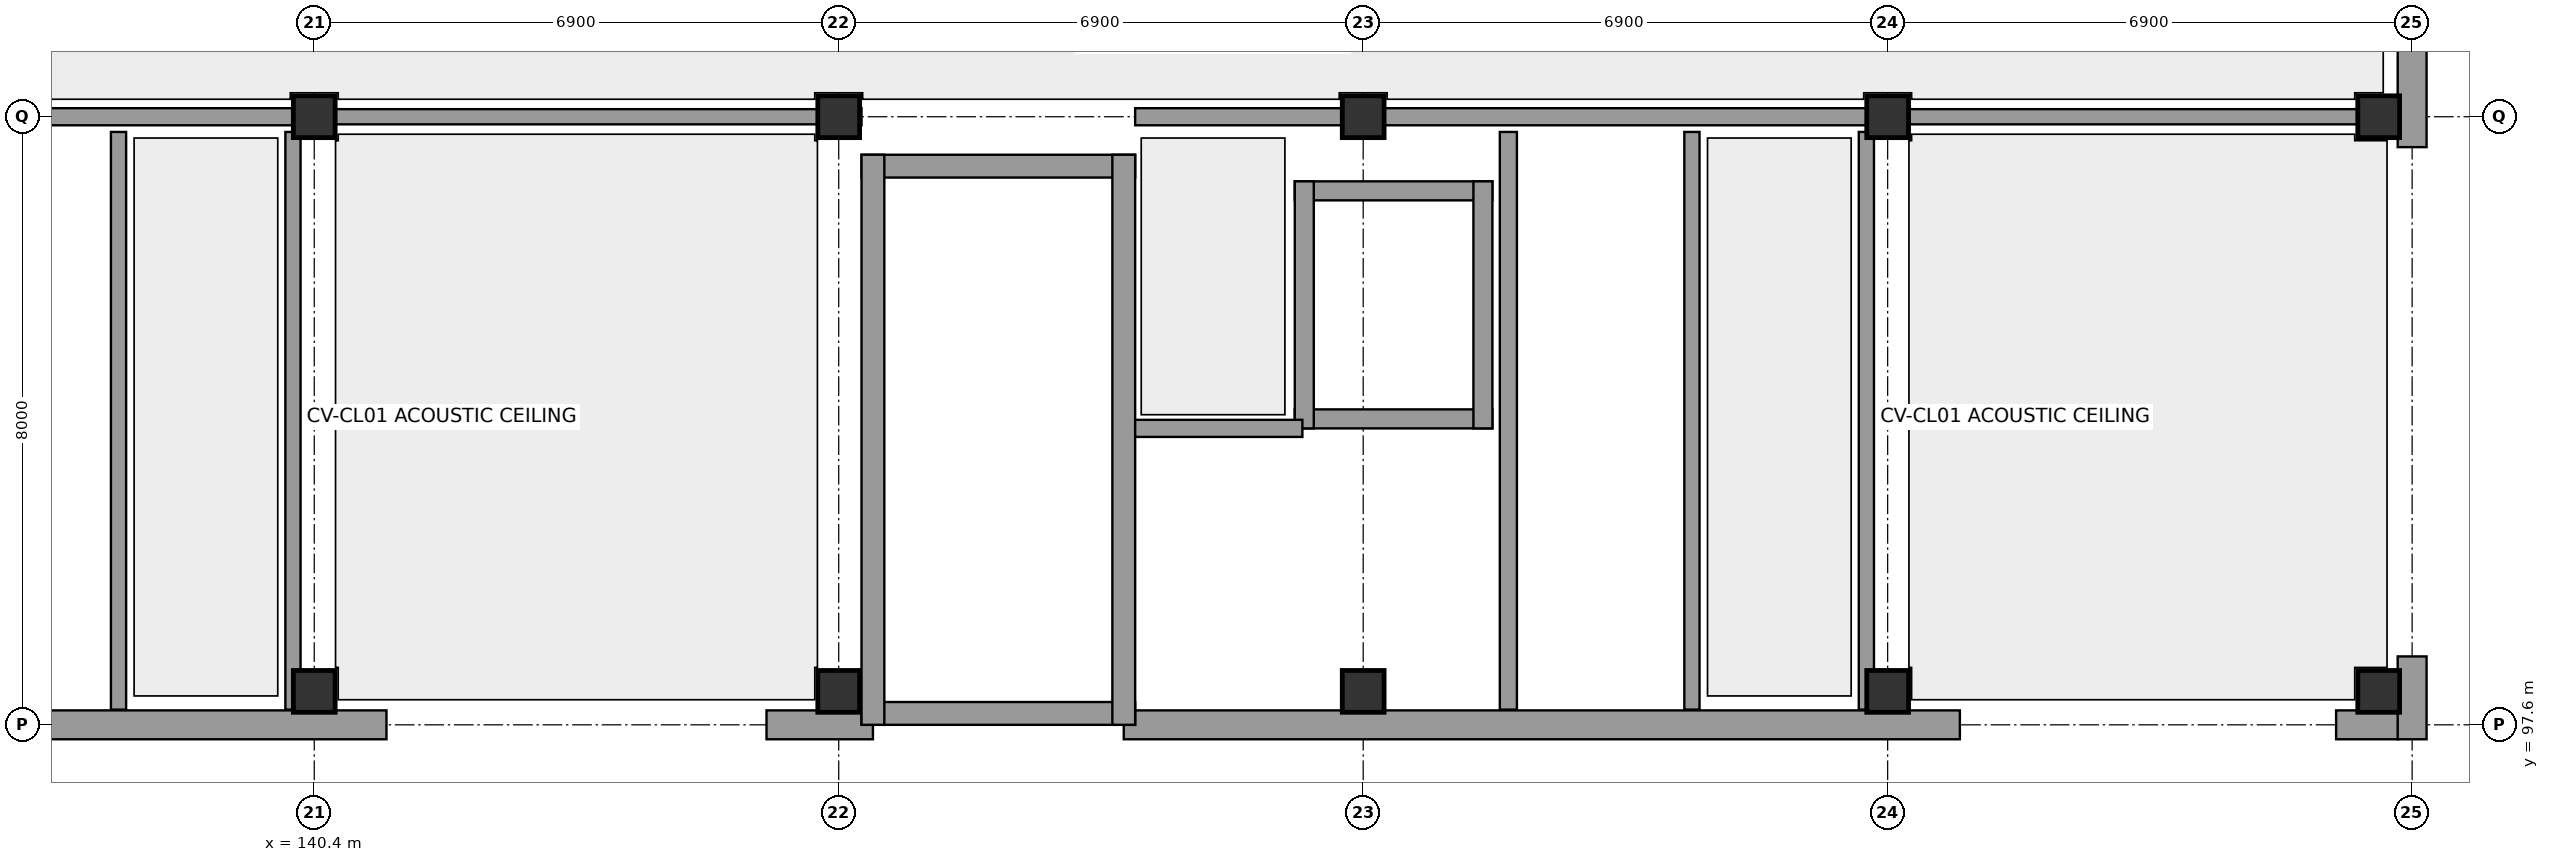
"""IFC4 building model, lengths in metres.
Left out: names, types, materials, properties, quantities, classifications, styles, units other than length and angle.
Written with IfcOpenShell. Run it as: python <this file> out.ifc"""

import sys

from ifc_helpers import new_model, si_unit, direction, frame, frame_2d, origin, origin_with_axes, origin_2d, place, context, subcontext, project, spatial, rectangle, extrude, element, fill, save


model = new_model("IFC4")
c1 = context("Model", 3, precision=1e-05, world=origin(), true_north=direction((0.0, 1.0)))
c2 = subcontext(c1, "Body", "Model", "MODEL_VIEW")
j1 = project(units=[si_unit("LENGTHUNIT", "METRE"), si_unit("PLANEANGLEUNIT", "RADIAN")], contexts=[c1])
p1 = place(None, origin())
s1 = spatial("IfcSite", under=j1, at=p1, CompositionType="ELEMENT")
p2 = place(p1, origin())
s2 = spatial("IfcBuilding", under=s1, at=p2, CompositionType="ELEMENT")
p3 = place(p2, origin())
s3 = spatial("IfcBuildingStorey", under=s2, at=p3, CompositionType="ELEMENT", Elevation=0.0)
for number, where, z_axis, x_axis in (
    (1, (140.4, 98.04, 0.0), (0.0, 0.0, 1.0), (1.0, 0.0, 0.0)),
    (2, (140.4, 105.6, 0.0), (0.0, 0.0, 1.0), (1.0, 0.0, 0.0)),
    (3, (147.3, 98.04, 0.0), (0.0, 0.0, 1.0), (1.0, 0.0, 0.0)),
    (4, (147.3, 105.6, 0.0), (0.0, 0.0, 1.0), (1.0, 0.0, 0.0)),
    (5, (154.2, 98.04, 0.0), (0.0, 0.0, 1.0), (1.0, 0.0, 0.0)),
    (6, (154.2, 105.6, 0.0), (0.0, 0.0, 1.0), (1.0, 0.0, 0.0)),
    (7, (161.1, 98.04, 0.0), (0.0, 0.0, 1.0), (1.0, 0.0, 0.0)),
    (8, (161.1, 105.6, 0.0), (0.0, 0.0, 1.0), (1.0, 0.0, 0.0)),
    (9, (167.56, 98.04, 0.0), (0.0, 0.0, 1.0), (1.0, 0.0, 0.0)),
    (10, (167.56, 105.6, 0.0), (0.0, 0.0, 1.0), (1.0, 0.0, 0.0)),
):
    element("IfcColumn", number, at=place(p3, frame(where, z_axis=z_axis, x_axis=x_axis)), inside=s3, PredefinedType="COLUMN", context=c2, shape_type="SweptSolid", body=[
        extrude(rectangle(XDim=0.55, YDim=0.55, at=origin_2d()), origin(), (0.0, 0.0, 1.0), 4.4),
    ])
p4 = place(p3, frame((130.35, 97.6, 0.0), z_axis=(0.0, 0.0, 1.0), x_axis=(1.0, 0.0, 0.0)))
e11 = element("IfcWall", 11, at=p4, inside=s3, PredefinedType="STANDARD", context=c2, shape_type="SweptSolid", body=[
    extrude(rectangle(XDim=11.0, YDim=0.38, at=frame_2d((5.5, 0.0))), origin(), (0.0, 0.0, 1.0), 4.12),
])
p5 = place(p3, frame((146.35, 97.6, 0.0), z_axis=(0.0, 0.0, 1.0), x_axis=(1.0, 0.0, 0.0)))
e12 = element("IfcWall", 12, at=p5, inside=s3, PredefinedType="STANDARD", context=c2, shape_type="SweptSolid", body=[
    extrude(rectangle(XDim=1.4, YDim=0.38, at=frame_2d((0.7, 0.0))), origin(), (0.0, 0.0, 1.0), 4.12),
])
p6 = place(p3, frame((151.05, 97.6, 0.0), z_axis=(0.0, 0.0, 1.0), x_axis=(1.0, 0.0, 0.0)))
e13 = element("IfcWall", 13, at=p6, inside=s3, PredefinedType="STANDARD", context=c2, shape_type="SweptSolid", body=[
    extrude(rectangle(XDim=11.0, YDim=0.38, at=frame_2d((5.5, 0.0))), origin(), (0.0, 0.0, 1.0), 4.12),
])
p7 = place(p3, frame((167.0, 97.6, 0.0), z_axis=(0.0, 0.0, 1.0), x_axis=(1.0, 0.0, 0.0)))
e14 = element("IfcWall", 14, at=p7, inside=s3, PredefinedType="STANDARD", context=c2, shape_type="SweptSolid", body=[
    extrude(rectangle(XDim=0.82, YDim=0.38, at=frame_2d((0.41, 0.0))), origin(), (0.0, 0.0, 1.0), 4.12),
])
p8 = place(p3, frame((168.0, 97.41, 0.0), z_axis=(0.0, 0.0, 1.0), x_axis=(0.0, 1.0, 0.0)))
e15 = element("IfcWall", 15, at=p8, inside=s3, PredefinedType="STANDARD", context=c2, shape_type="SweptSolid", body=[
    extrude(rectangle(XDim=1.09, YDim=0.38, at=frame_2d((0.545, 0.0))), origin(), (0.0, 0.0, 1.0), 4.12),
])
p9 = place(p3, frame((168.0, 105.2, 0.0), z_axis=(0.0, 0.0, 1.0), x_axis=(0.0, 1.0, 0.0)))
e16 = element("IfcWall", 16, at=p9, inside=s3, PredefinedType="STANDARD", context=c2, shape_type="SweptSolid", body=[
    extrude(rectangle(XDim=3.2, YDim=0.38, at=frame_2d((1.6, 0.0))), origin(), (0.0, 0.0, 1.0), 4.12),
])
for number, where, z_axis, x_axis in (
    (17, (137.825, 97.8, 0.0), (0.0, 0.0, 1.0), (0.0, 1.0, 0.0)),
    (18, (140.12, 97.8, 0.0), (0.0, 0.0, 1.0), (0.0, 1.0, 0.0)),
):
    element("IfcWall", number, at=place(p3, frame(where, z_axis=z_axis, x_axis=x_axis)), inside=s3, PredefinedType="PARTITIONING", context=c2, shape_type="SweptSolid", body=[
        extrude(rectangle(XDim=7.6, YDim=0.2, at=frame_2d((3.8, 0.0))), origin(), (0.0, 0.0, 1.0), 4.12),
    ])
p10 = place(p3, frame((130.5, 105.6, 0.0), z_axis=(0.0, 0.0, 1.0), x_axis=(1.0, 0.0, 0.0)))
e19 = element("IfcWall", 19, at=p10, inside=s3, PredefinedType="PARTITIONING", context=c2, shape_type="SweptSolid", body=[
    extrude(rectangle(XDim=9.9, YDim=0.225, at=frame_2d((4.95, 0.0))), origin(), (0.0, 0.0, 1.0), 3.56),
])
p11 = place(p10, frame((0.475, 0.0, 0.0)))
e20 = element("IfcOpeningElement", 20, at=p11, cuts=e19, PredefinedType="OPENING", context=c2, shape_type="SweptSolid", body=[
    extrude(rectangle(XDim=1.1, YDim=2.15, at=frame_2d((0.55, 1.075))), frame((0.0, 0.125, 0.0), z_axis=(0.0, -1.0, 0.0), x_axis=(1.0, 0.0, 0.0)), (0.0, 0.0, 1.0), 0.249),
])
p12 = place(p10, frame((5.75, 0.0, 0.0)))
e21 = element("IfcOpeningElement", 21, at=p12, cuts=e19, PredefinedType="OPENING", context=c2, shape_type="SweptSolid", body=[
    extrude(rectangle(XDim=0.9, YDim=2.1, at=frame_2d((0.45, 1.05))), frame((0.0, 0.125, 0.0), z_axis=(0.0, -1.0, 0.0), x_axis=(1.0, 0.0, 0.0)), (0.0, 0.0, 1.0), 0.249),
])
p13 = place(p10, frame((7.8, 0.0, 0.0)))
e22 = element("IfcOpeningElement", 22, at=p13, cuts=e19, PredefinedType="OPENING", context=c2, shape_type="SweptSolid", body=[
    extrude(rectangle(XDim=0.95, YDim=2.15, at=frame_2d((0.475, 1.075))), frame((0.0, 0.125, 0.0), z_axis=(0.0, -1.0, 0.0), x_axis=(1.0, 0.0, 0.0)), (0.0, 0.0, 1.0), 0.249),
])
p14 = place(p3, frame((147.6, 97.75, 0.0), z_axis=(0.0, 0.0, 1.0), x_axis=(1.0, 0.0, 0.0)))
e23 = element("IfcWall", 23, at=p14, inside=s3, PredefinedType="SHEAR", context=c2, shape_type="SweptSolid", body=[
    extrude(rectangle(XDim=3.6, YDim=0.3, at=frame_2d((1.8, 0.0))), origin(), (0.0, 0.0, 1.0), 4.12),
])
p15 = place(p14, frame((1.1, 0.0, 0.0)))
e24 = element("IfcOpeningElement", 24, at=p15, cuts=e23, PredefinedType="OPENING", context=c2, shape_type="SweptSolid", body=[
    extrude(rectangle(XDim=1.4, YDim=2.25, at=frame_2d((0.7, 1.125))), frame((0.0, 0.162, 0.0), z_axis=(0.0, -1.0, 0.0), x_axis=(1.0, 0.0, 0.0)), (0.0, 0.0, 1.0), 0.324),
])
p16 = place(p3, frame((147.6, 104.95, 0.0), z_axis=(0.0, 0.0, 1.0), x_axis=(1.0, 0.0, 0.0)))
e25 = element("IfcWall", 25, at=p16, inside=s3, PredefinedType="SHEAR", context=c2, shape_type="SweptSolid", body=[
    extrude(rectangle(XDim=3.6, YDim=0.3, at=frame_2d((1.8, 0.0))), origin(), (0.0, 0.0, 1.0), 4.12),
])
p17 = place(p3, frame((147.75, 97.6, 0.0), z_axis=(0.0, 0.0, 1.0), x_axis=(0.0, 1.0, 0.0)))
e26 = element("IfcWall", 26, at=p17, inside=s3, PredefinedType="SHEAR", context=c2, shape_type="SweptSolid", body=[
    extrude(rectangle(XDim=7.5, YDim=0.3, at=frame_2d((3.75, 0.0))), origin(), (0.0, 0.0, 1.0), 4.12),
])
p18 = place(p3, frame((151.05, 97.6, 0.0), z_axis=(0.0, 0.0, 1.0), x_axis=(0.0, 1.0, 0.0)))
e27 = element("IfcWall", 27, at=p18, inside=s3, PredefinedType="SHEAR", context=c2, shape_type="SweptSolid", body=[
    extrude(rectangle(XDim=7.5, YDim=0.3, at=frame_2d((3.75, 0.0))), origin(), (0.0, 0.0, 1.0), 4.12),
])
p19 = place(p18, frame((0.65, 0.0, 0.0)))
e28 = element("IfcOpeningElement", 28, at=p19, cuts=e27, PredefinedType="OPENING", context=c2, shape_type="SweptSolid", body=[
    extrude(rectangle(XDim=1.15, YDim=2.15, at=frame_2d((0.575, 1.075))), frame((0.0, 0.162, 0.0), z_axis=(0.0, -1.0, 0.0), x_axis=(1.0, 0.0, 0.0)), (0.0, 0.0, 1.0), 0.324),
])
p20 = place(p3, frame((153.3, 101.625, 0.0), z_axis=(0.0, 0.0, 1.0), x_axis=(1.0, 0.0, 0.0)))
e29 = element("IfcWall", 29, at=p20, inside=s3, PredefinedType="SHEAR", context=c2, shape_type="SweptSolid", body=[
    extrude(rectangle(XDim=2.6, YDim=0.25, at=frame_2d((1.3, 0.0))), origin(), (0.0, 0.0, 1.0), 4.12),
])
p21 = place(p20, frame((0.925, 0.0, 0.0)))
e30 = element("IfcOpeningElement", 30, at=p21, cuts=e29, PredefinedType="OPENING", context=c2, shape_type="SweptSolid", body=[
    extrude(rectangle(XDim=1.0, YDim=2.1, at=frame_2d((0.5, 1.05))), frame((0.0, 0.137, 0.0), z_axis=(0.0, -1.0, 0.0), x_axis=(1.0, 0.0, 0.0)), (0.0, 0.0, 1.0), 0.274),
])
p22 = place(p3, frame((153.3, 104.625, 0.0), z_axis=(0.0, 0.0, 1.0), x_axis=(1.0, 0.0, 0.0)))
e31 = element("IfcWall", 31, at=p22, inside=s3, PredefinedType="SHEAR", context=c2, shape_type="SweptSolid", body=[
    extrude(rectangle(XDim=2.6, YDim=0.25, at=frame_2d((1.3, 0.0))), origin(), (0.0, 0.0, 1.0), 4.12),
])
for number, where, z_axis, x_axis in (
    (32, (153.425, 101.5, 0.0), (0.0, 0.0, 1.0), (0.0, 1.0, 0.0)),
    (33, (155.775, 101.5, 0.0), (0.0, 0.0, 1.0), (0.0, 1.0, 0.0)),
):
    element("IfcWall", number, at=place(p3, frame(where, z_axis=z_axis, x_axis=x_axis)), inside=s3, PredefinedType="SHEAR", context=c2, shape_type="SweptSolid", body=[
        extrude(rectangle(XDim=3.25, YDim=0.25, at=frame_2d((1.625, 0.0))), origin(), (0.0, 0.0, 1.0), 4.12),
    ])
p23 = place(p3, frame((156.11, 97.8, 0.0), z_axis=(0.0, 0.0, 1.0), x_axis=(0.0, 1.0, 0.0)))
e34 = element("IfcWall", 34, at=p23, inside=s3, PredefinedType="PARTITIONING", context=c2, shape_type="SweptSolid", body=[
    extrude(rectangle(XDim=7.6, YDim=0.225, at=frame_2d((3.8, 0.0))), origin(), (0.0, 0.0, 1.0), 3.79),
])
p24 = place(p3, frame((151.2, 101.5, 0.0), z_axis=(0.0, 0.0, 1.0), x_axis=(1.0, 0.0, 0.0)))
e35 = element("IfcWall", 35, at=p24, inside=s3, PredefinedType="PARTITIONING", context=c2, shape_type="SweptSolid", body=[
    extrude(rectangle(XDim=2.2, YDim=0.225, at=frame_2d((1.1, 0.0))), origin(), (0.0, 0.0, 1.0), 4.12),
])
p25 = place(p24, frame((0.45, 0.0, 0.0)))
e36 = element("IfcOpeningElement", 36, at=p25, cuts=e35, PredefinedType="OPENING", context=c2, shape_type="SweptSolid", body=[
    extrude(rectangle(XDim=1.1, YDim=2.15, at=frame_2d((0.55, 1.075))), frame((0.0, 0.125, 0.0), z_axis=(0.0, -1.0, 0.0), x_axis=(1.0, 0.0, 0.0)), (0.0, 0.0, 1.0), 0.249),
])
p26 = place(p3, frame((147.3, 105.6, 0.0), z_axis=(0.0, 0.0, 1.0), x_axis=(1.0, 0.0, 0.0)))
e37 = element("IfcWall", 37, at=p26, inside=s3, PredefinedType="PARTITIONING", context=c2, shape_type="SweptSolid", body=[
    extrude(rectangle(XDim=0.3, YDim=0.225, at=frame_2d((0.15, 0.0))), origin(), (0.0, 0.0, 1.0), 4.12),
])
p27 = place(p3, frame((158.525, 97.8, 0.0), z_axis=(0.0, 0.0, 1.0), x_axis=(0.0, 1.0, 0.0)))
e38 = element("IfcWall", 38, at=p27, inside=s3, PredefinedType="PARTITIONING", context=c2, shape_type="SweptSolid", body=[
    extrude(rectangle(XDim=7.6, YDim=0.2, at=frame_2d((3.8, 0.0))), origin(), (0.0, 0.0, 1.0), 3.79),
])
p28 = place(p3, frame((160.82, 97.8, 0.0), z_axis=(0.0, 0.0, 1.0), x_axis=(0.0, 1.0, 0.0)))
e39 = element("IfcWall", 39, at=p28, inside=s3, PredefinedType="PARTITIONING", context=c2, shape_type="SweptSolid", body=[
    extrude(rectangle(XDim=7.6, YDim=0.2, at=frame_2d((3.8, 0.0))), origin(), (0.0, 0.0, 1.0), 3.56),
])
p29 = place(p3, frame((151.2, 105.6, 0.0), z_axis=(0.0, 0.0, 1.0), x_axis=(1.0, 0.0, 0.0)))
e40 = element("IfcWall", 40, at=p29, inside=s3, PredefinedType="PARTITIONING", context=c2, shape_type="SweptSolid", body=[
    extrude(rectangle(XDim=9.9, YDim=0.225, at=frame_2d((4.95, 0.0))), origin(), (0.0, 0.0, 1.0), 3.56),
])
p30 = place(p29, frame((0.475, 0.0, 0.0)))
e41 = element("IfcOpeningElement", 41, at=p30, cuts=e40, PredefinedType="OPENING", context=c2, shape_type="SweptSolid", body=[
    extrude(rectangle(XDim=1.1, YDim=2.15, at=frame_2d((0.55, 1.075))), frame((0.0, 0.125, 0.0), z_axis=(0.0, -1.0, 0.0), x_axis=(1.0, 0.0, 0.0)), (0.0, 0.0, 1.0), 0.249),
])
p31 = place(p29, frame((5.75, 0.0, 0.0)))
e42 = element("IfcOpeningElement", 42, at=p31, cuts=e40, PredefinedType="OPENING", context=c2, shape_type="SweptSolid", body=[
    extrude(rectangle(XDim=0.9, YDim=2.1, at=frame_2d((0.45, 1.05))), frame((0.0, 0.125, 0.0), z_axis=(0.0, -1.0, 0.0), x_axis=(1.0, 0.0, 0.0)), (0.0, 0.0, 1.0), 0.249),
])
p32 = place(p29, frame((7.8, 0.0, 0.0)))
e43 = element("IfcOpeningElement", 43, at=p32, cuts=e40, PredefinedType="OPENING", context=c2, shape_type="SweptSolid", body=[
    extrude(rectangle(XDim=0.95, YDim=2.15, at=frame_2d((0.475, 1.075))), frame((0.0, 0.125, 0.0), z_axis=(0.0, -1.0, 0.0), x_axis=(1.0, 0.0, 0.0)), (0.0, 0.0, 1.0), 0.249),
])
p33 = place(p3, frame((140.6, 105.6, 0.0), z_axis=(0.0, 0.0, 1.0), x_axis=(1.0, 0.0, 0.0)))
e44 = element("IfcWall", 44, at=p33, inside=s3, PredefinedType="PARTITIONING", context=c2, shape_type="SweptSolid", body=[
    extrude(rectangle(XDim=6.5, YDim=0.2, at=frame_2d((3.25, 0.0))), origin(), (0.0, 0.0, 1.0), 3.56),
])
p34 = place(p33, frame((1.9, 0.0, 0.0)))
e45 = element("IfcOpeningElement", 45, at=p34, cuts=e44, PredefinedType="OPENING", context=c2, shape_type="SweptSolid", body=[
    extrude(rectangle(XDim=0.95, YDim=2.15, at=frame_2d((0.475, 1.075))), frame((0.0, 0.112, 0.0), z_axis=(0.0, -1.0, 0.0), x_axis=(1.0, 0.0, 0.0)), (0.0, 0.0, 1.0), 0.224),
])
p35 = place(p3, frame((161.3, 105.6, 0.0), z_axis=(0.0, 0.0, 1.0), x_axis=(1.0, 0.0, 0.0)))
e46 = element("IfcWall", 46, at=p35, inside=s3, PredefinedType="PARTITIONING", context=c2, shape_type="SweptSolid", body=[
    extrude(rectangle(XDim=6.45, YDim=0.2, at=frame_2d((3.225, 0.0))), origin(), (0.0, 0.0, 1.0), 3.56),
])
p36 = place(p35, frame((1.9, 0.0, 0.0)))
e47 = element("IfcOpeningElement", 47, at=p36, cuts=e46, PredefinedType="OPENING", context=c2, shape_type="SweptSolid", body=[
    extrude(rectangle(XDim=0.95, YDim=2.15, at=frame_2d((0.475, 1.075))), frame((0.0, 0.112, 0.0), z_axis=(0.0, -1.0, 0.0), x_axis=(1.0, 0.0, 0.0)), (0.0, 0.0, 1.0), 0.224),
])
p37 = place(p12, origin_with_axes())
e48 = element("IfcDoor", 48, at=p37, inside=s3, OperationType="SINGLE_SWING_LEFT", PredefinedType="DOOR", context=c2, shape_type="SweptSolid", body=[
    extrude(rectangle(XDim=0.9, YDim=2.1, at=frame_2d((0.45, 1.05))), frame((0.0, 0.025, 0.0), z_axis=(0.0, -1.0, 0.0), x_axis=(1.0, 0.0, 0.0)), (0.0, 0.0, 1.0), 0.05),
])
fill(e21, e48)
p38 = place(p13, origin_with_axes())
e49 = element("IfcDoor", 49, at=p38, inside=s3, OperationType="SINGLE_SWING_RIGHT", PredefinedType="DOOR", context=c2, shape_type="SweptSolid", body=[
    extrude(rectangle(XDim=0.95, YDim=2.15, at=frame_2d((0.475, 1.075))), frame((0.0, 0.025, 0.0), z_axis=(0.0, -1.0, 0.0), x_axis=(1.0, 0.0, 0.0)), (0.0, 0.0, 1.0), 0.05),
])
fill(e22, e49)
p39 = place(p15, frame((1.4, 0.0, 0.0), z_axis=(0.0, 0.0, 1.0), x_axis=(-1.0, 0.0, 0.0)))
e50 = element("IfcDoor", 50, at=p39, inside=s3, OperationType="DOUBLE_DOOR_SINGLE_SWING", PredefinedType="DOOR", context=c2, shape_type="SweptSolid", body=[
    extrude(rectangle(XDim=1.4, YDim=2.25, at=frame_2d((0.7, 1.125))), frame((0.0, 0.025, 0.0), z_axis=(0.0, -1.0, 0.0), x_axis=(1.0, 0.0, 0.0)), (0.0, 0.0, 1.0), 0.05),
])
fill(e24, e50)
p40 = place(p19, origin_with_axes())
e51 = element("IfcDoor", 51, at=p40, inside=s3, OperationType="SINGLE_SWING_RIGHT", PredefinedType="DOOR", context=c2, shape_type="SweptSolid", body=[
    extrude(rectangle(XDim=1.15, YDim=2.15, at=frame_2d((0.575, 1.075))), frame((0.0, 0.025, 0.0), z_axis=(0.0, -1.0, 0.0), x_axis=(1.0, 0.0, 0.0)), (0.0, 0.0, 1.0), 0.05),
])
fill(e28, e51)
p41 = place(p21, origin_with_axes())
e52 = element("IfcDoor", 52, at=p41, inside=s3, OperationType="SLIDING_TO_LEFT", PredefinedType="DOOR", context=c2, shape_type="SweptSolid", body=[
    extrude(rectangle(XDim=1.0, YDim=2.1, at=frame_2d((0.5, 1.05))), frame((0.0, 0.025, 0.0), z_axis=(0.0, -1.0, 0.0), x_axis=(1.0, 0.0, 0.0)), (0.0, 0.0, 1.0), 0.05),
])
fill(e30, e52)
p42 = place(p25, frame((1.1, 0.0, 0.0), z_axis=(0.0, 0.0, 1.0), x_axis=(-1.0, 0.0, 0.0)))
e53 = element("IfcDoor", 53, at=p42, inside=s3, OperationType="SINGLE_SWING_LEFT", PredefinedType="DOOR", context=c2, shape_type="SweptSolid", body=[
    extrude(rectangle(XDim=1.1, YDim=2.15, at=frame_2d((0.55, 1.075))), frame((0.0, 0.025, 0.0), z_axis=(0.0, -1.0, 0.0), x_axis=(1.0, 0.0, 0.0)), (0.0, 0.0, 1.0), 0.05),
])
fill(e36, e53)
p43 = place(p30, frame((1.1, 0.0, 0.0), z_axis=(0.0, 0.0, 1.0), x_axis=(-1.0, 0.0, 0.0)))
e54 = element("IfcDoor", 54, at=p43, inside=s3, OperationType="SINGLE_SWING_RIGHT", PredefinedType="DOOR", context=c2, shape_type="SweptSolid", body=[
    extrude(rectangle(XDim=1.1, YDim=2.15, at=frame_2d((0.55, 1.075))), frame((0.0, 0.025, 0.0), z_axis=(0.0, -1.0, 0.0), x_axis=(1.0, 0.0, 0.0)), (0.0, 0.0, 1.0), 0.05),
])
fill(e41, e54)
p44 = place(p31, origin_with_axes())
e55 = element("IfcDoor", 55, at=p44, inside=s3, OperationType="SINGLE_SWING_LEFT", PredefinedType="DOOR", context=c2, shape_type="SweptSolid", body=[
    extrude(rectangle(XDim=0.9, YDim=2.1, at=frame_2d((0.45, 1.05))), frame((0.0, 0.025, 0.0), z_axis=(0.0, -1.0, 0.0), x_axis=(1.0, 0.0, 0.0)), (0.0, 0.0, 1.0), 0.05),
])
fill(e42, e55)
p45 = place(p32, origin_with_axes())
e56 = element("IfcDoor", 56, at=p45, inside=s3, OperationType="SINGLE_SWING_RIGHT", PredefinedType="DOOR", context=c2, shape_type="SweptSolid", body=[
    extrude(rectangle(XDim=0.95, YDim=2.15, at=frame_2d((0.475, 1.075))), frame((0.0, 0.025, 0.0), z_axis=(0.0, -1.0, 0.0), x_axis=(1.0, 0.0, 0.0)), (0.0, 0.0, 1.0), 0.05),
])
fill(e43, e56)
p46 = place(p34, frame((0.95, 0.0, 0.0), z_axis=(0.0, 0.0, 1.0), x_axis=(-1.0, 0.0, 0.0)))
e57 = element("IfcDoor", 57, at=p46, inside=s3, OperationType="SINGLE_SWING_LEFT", PredefinedType="DOOR", context=c2, shape_type="SweptSolid", body=[
    extrude(rectangle(XDim=0.95, YDim=2.15, at=frame_2d((0.475, 1.075))), frame((0.0, 0.025, 0.0), z_axis=(0.0, -1.0, 0.0), x_axis=(1.0, 0.0, 0.0)), (0.0, 0.0, 1.0), 0.05),
])
fill(e45, e57)
p47 = place(p36, origin_with_axes())
e58 = element("IfcDoor", 58, at=p47, inside=s3, OperationType="SINGLE_SWING_LEFT", PredefinedType="DOOR", context=c2, shape_type="SweptSolid", body=[
    extrude(rectangle(XDim=0.95, YDim=2.15, at=frame_2d((0.475, 1.075))), frame((0.0, 0.025, 0.0), z_axis=(0.0, -1.0, 0.0), x_axis=(1.0, 0.0, 0.0)), (0.0, 0.0, 1.0), 0.05),
])
fill(e47, e58)
save(model, sys.argv[1])
